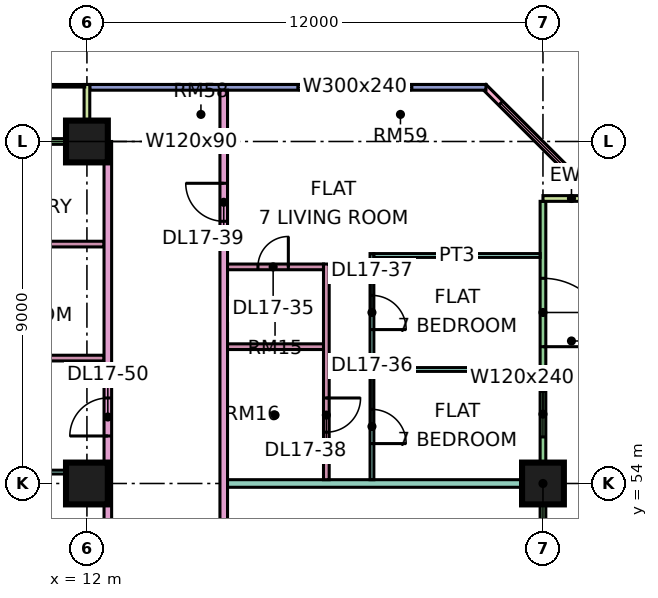
"""IFC4 building model, lengths in metres.
Left out: names, types, materials, properties, quantities, classifications, styles, units other than length and angle.
Written with IfcOpenShell. Run it as: python <this file> out.ifc"""

import sys

from ifc_helpers import new_model, si_unit, direction, frame, frame_2d, origin, origin_2d, place, context, subcontext, project, spatial, rectangle, extrude, element, fill, save


model = new_model("IFC4")
c1 = context("Model", 3, precision=1e-05, world=origin(), true_north=direction((0.0, 1.0)))
c2 = subcontext(c1, "Body", "Model", "MODEL_VIEW")
j1 = project(units=[si_unit("LENGTHUNIT", "METRE"), si_unit("PLANEANGLEUNIT", "RADIAN")], contexts=[c1])
p1 = place(None, origin())
s1 = spatial("IfcSite", under=j1, at=p1, CompositionType="ELEMENT")
p2 = place(p1, origin())
s2 = spatial("IfcBuilding", under=s1, at=p2, CompositionType="ELEMENT")
p3 = place(p2, frame((0.0, 0.0, 78.9)))
s3 = spatial("IfcBuildingStorey", under=s2, at=p3, CompositionType="ELEMENT", Elevation=78.9)
for number, where, z_axis, x_axis in (
    (1, (12.0, 54.0, 0.0), (0.0, 0.0, 1.0), (1.0, 0.0, 0.0)),
    (2, (12.0, 63.0, 0.0), (0.0, 0.0, 1.0), (1.0, 0.0, 0.0)),
    (3, (24.0, 54.0, 0.0), (0.0, 0.0, 1.0), (1.0, 0.0, 0.0)),
):
    element("IfcColumn", number, at=place(p3, frame(where, z_axis=z_axis, x_axis=x_axis)), inside=s3, PredefinedType="COLUMN", context=c2, shape_type="SweptSolid", body=[
        extrude(rectangle(XDim=1.1, YDim=1.1, at=origin_2d()), origin(), (0.0, 0.0, 1.0), 3.75),
    ])
p4 = place(p3, frame((24.0, 48.075, 0.0), z_axis=(0.0, 0.0, 1.0), x_axis=(0.0, 1.0, 0.0)))
e4 = element("IfcWall", 4, at=p4, inside=s3, PredefinedType="SOLIDWALL", context=c2, shape_type="SweptSolid", body=[
    extrude(rectangle(XDim=13.35, YDim=0.15, at=frame_2d((6.675, 0.0))), origin(), (0.0, 0.0, 1.0), 3.35),
])
p5 = place(p4, frame((0.538, 0.0, 0.45)))
e5 = element("IfcOpeningElement", 5, at=p5, cuts=e4, PredefinedType="OPENING", context=c2, shape_type="SweptSolid", body=[
    extrude(rectangle(XDim=4.2, YDim=2.4, at=frame_2d((2.1, 1.2))), frame((0.0, 0.085, 0.0), z_axis=(0.0, -1.0, 0.0), x_axis=(1.0, 0.0, 0.0)), (0.0, 0.0, 1.0), 0.17),
])
p6 = place(p4, frame((7.15, 0.0, 0.45)))
e6 = element("IfcOpeningElement", 6, at=p6, cuts=e4, PredefinedType="OPENING", context=c2, shape_type="SweptSolid", body=[
    extrude(rectangle(XDim=1.2, YDim=2.4, at=frame_2d((0.6, 1.2))), frame((0.0, 0.085, 0.0), z_axis=(0.0, -1.0, 0.0), x_axis=(1.0, 0.0, 0.0)), (0.0, 0.0, 1.0), 0.17),
])
p7 = place(p4, frame((9.525, 0.0, 0.0)))
e7 = element("IfcOpeningElement", 7, at=p7, cuts=e4, PredefinedType="OPENING", context=c2, shape_type="SweptSolid", body=[
    extrude(rectangle(XDim=1.8, YDim=2.4, at=frame_2d((0.9, 1.2))), frame((0.0, 0.085, 0.0), z_axis=(0.0, -1.0, 0.0), x_axis=(1.0, 0.0, 0.0)), (0.0, 0.0, 1.0), 0.17),
])
p8 = place(p3, frame((25.5, 61.5, 0.0), z_axis=(0.0, 0.0, 1.0), x_axis=(-1.0, 0.0, 0.0)))
e8 = element("IfcWall", 8, at=p8, inside=s3, PredefinedType="SOLIDWALL", context=c2, shape_type="SweptSolid", body=[
    extrude(rectangle(XDim=1.5, YDim=0.15, at=frame_2d((0.75, 0.0))), origin(), (0.0, 0.0, 1.0), 3.35),
])
p9 = place(p3, frame((25.447, 61.447, 0.0), z_axis=(0.0, 0.0, 1.0), x_axis=(-0.707106781187, 0.707106781187, 0.0)))
e9 = element("IfcWall", 9, at=p9, inside=s3, PredefinedType="SOLIDWALL", context=c2, shape_type="SweptSolid", body=[
    extrude(rectangle(XDim=4.243, YDim=0.15, at=frame_2d((2.121, 0.0))), origin(), (0.0, 0.0, 1.0), 3.35),
])
p10 = place(p9, frame((0.621, 0.0, 0.45)))
e10 = element("IfcOpeningElement", 10, at=p10, cuts=e9, PredefinedType="OPENING", context=c2, shape_type="SweptSolid", body=[
    extrude(rectangle(XDim=3.0, YDim=2.4, at=frame_2d((1.5, 1.2))), frame((0.0, 0.085, 0.0), z_axis=(0.0, -1.0, 0.0), x_axis=(1.0, 0.0, 0.0)), (0.0, 0.0, 1.0), 0.17),
])
p11 = place(p3, frame((22.5, 64.425, 0.0), z_axis=(0.0, 0.0, 1.0), x_axis=(-1.0, 0.0, 0.0)))
e11 = element("IfcWall", 11, at=p11, inside=s3, PredefinedType="SOLIDWALL", context=c2, shape_type="SweptSolid", body=[
    extrude(rectangle(XDim=10.425, YDim=0.15, at=frame_2d((5.212, 0.0))), origin(), (0.0, 0.0, 1.0), 3.35),
])
p12 = place(p11, frame((1.95, 0.0, 0.45)))
e12 = element("IfcOpeningElement", 12, at=p12, cuts=e11, PredefinedType="OPENING", context=c2, shape_type="SweptSolid", body=[
    extrude(rectangle(XDim=3.0, YDim=2.4, at=frame_2d((1.5, 1.2))), frame((0.0, 0.085, 0.0), z_axis=(0.0, -1.0, 0.0), x_axis=(1.0, 0.0, 0.0)), (0.0, 0.0, 1.0), 0.17),
])
p13 = place(p3, frame((11.925, 63.0, 0.0), z_axis=(0.0, 0.0, 1.0), x_axis=(-1.0, 0.0, 0.0)))
e13 = element("IfcWall", 13, at=p13, inside=s3, PredefinedType="SOLIDWALL", context=c2, shape_type="SweptSolid", body=[
    extrude(rectangle(XDim=10.35, YDim=0.15, at=frame_2d((5.175, 0.0))), origin(), (0.0, 0.0, 1.0), 3.35),
])
p14 = place(p13, frame((1.775, 0.0, 1.7)))
e14 = element("IfcOpeningElement", 14, at=p14, cuts=e13, PredefinedType="OPENING", context=c2, shape_type="SweptSolid", body=[
    extrude(rectangle(XDim=1.2, YDim=0.9, at=frame_2d((0.6, 0.45))), frame((0.0, 0.085, 0.0), z_axis=(0.0, -1.0, 0.0), x_axis=(1.0, 0.0, 0.0)), (0.0, 0.0, 1.0), 0.17),
])
p15 = place(p13, frame((6.962, 0.0, 0.0)))
e15 = element("IfcOpeningElement", 15, at=p15, cuts=e13, PredefinedType="OPENING", context=c2, shape_type="SweptSolid", body=[
    extrude(rectangle(XDim=1.8, YDim=2.4, at=frame_2d((0.9, 1.2))), frame((0.0, 0.085, 0.0), z_axis=(0.0, -1.0, 0.0), x_axis=(1.0, 0.0, 0.0)), (0.0, 0.0, 1.0), 0.17),
])
p16 = place(p3, frame((12.0, 64.5, 0.0), z_axis=(0.0, 0.0, 1.0), x_axis=(0.0, -1.0, 0.0)))
e16 = element("IfcWall", 16, at=p16, inside=s3, PredefinedType="SOLIDWALL", context=c2, shape_type="SweptSolid", body=[
    extrude(rectangle(XDim=1.5, YDim=0.15, at=frame_2d((0.75, 0.0))), origin(), (0.0, 0.0, 1.0), 3.35),
])
p17 = place(p3, frame((7.8, 54.3, 0.0), z_axis=(0.0, 0.0, 1.0), x_axis=(1.0, 0.0, 0.0)))
e17 = element("IfcWall", 17, at=p17, inside=s3, PredefinedType="PARTITIONING", context=c2, shape_type="SweptSolid", body=[
    extrude(rectangle(XDim=4.65, YDim=0.1, at=frame_2d((2.325, 0.0))), origin(), (0.0, 0.0, 1.0), 3.35),
])
for number, where, z_axis, x_axis in (
    (18, (7.825, 57.3, 0.0), (0.0, 0.0, 1.0), (1.0, 0.0, 0.0)),
    (19, (7.825, 60.3, 0.0), (0.0, 0.0, 1.0), (1.0, 0.0, 0.0)),
):
    element("IfcWall", number, at=place(p3, frame(where, z_axis=z_axis, x_axis=x_axis)), inside=s3, PredefinedType="PARTITIONING", context=c2, shape_type="SweptSolid", body=[
        extrude(rectangle(XDim=4.625, YDim=0.15, at=frame_2d((2.312, 0.0))), origin(), (0.0, 0.0, 1.0), 3.35),
    ])
p18 = place(p3, frame((12.55, 20.0, 0.0), z_axis=(0.0, 0.0, 1.0), x_axis=(0.0, 1.0, 0.0)))
e20 = element("IfcWall", 20, at=p18, inside=s3, PredefinedType="PARTITIONING", context=c2, shape_type="SweptSolid", body=[
    extrude(rectangle(XDim=43.0, YDim=0.2, at=frame_2d((21.5, 0.0))), origin(), (0.0, 0.0, 1.0), 3.35),
])
p19 = place(p18, frame((16.95, 0.0, 0.0)))
e21 = element("IfcOpeningElement", 21, at=p19, cuts=e20, PredefinedType="OPENING", context=c2, shape_type="SweptSolid", body=[
    extrude(rectangle(XDim=1.0, YDim=2.1, at=frame_2d((0.5, 1.05))), frame((0.0, 0.11, 0.0), z_axis=(0.0, -1.0, 0.0), x_axis=(1.0, 0.0, 0.0)), (0.0, 0.0, 1.0), 0.22),
])
p20 = place(p18, frame((35.25, 0.0, 0.0)))
e22 = element("IfcOpeningElement", 22, at=p20, cuts=e20, PredefinedType="OPENING", context=c2, shape_type="SweptSolid", body=[
    extrude(rectangle(XDim=1.0, YDim=2.1, at=frame_2d((0.5, 1.05))), frame((0.0, 0.11, 0.0), z_axis=(0.0, -1.0, 0.0), x_axis=(1.0, 0.0, 0.0)), (0.0, 0.0, 1.0), 0.22),
])
p21 = place(p18, frame((0.6, 0.0, 0.0)))
e23 = element("IfcOpeningElement", 23, at=p21, cuts=e20, PredefinedType="OPENING", context=c2, shape_type="SweptSolid", body=[
    extrude(rectangle(XDim=1.2, YDim=2.1, at=frame_2d((0.6, 1.05))), frame((0.0, 0.11, 0.0), z_axis=(0.0, -1.0, 0.0), x_axis=(1.0, 0.0, 0.0)), (0.0, 0.0, 1.0), 0.22),
])
p22 = place(p18, frame((14.1, 0.0, 0.0)))
e24 = element("IfcOpeningElement", 24, at=p22, cuts=e20, PredefinedType="OPENING", context=c2, shape_type="SweptSolid", body=[
    extrude(rectangle(XDim=1.0, YDim=2.1, at=frame_2d((0.5, 1.05))), frame((0.0, 0.11, 0.0), z_axis=(0.0, -1.0, 0.0), x_axis=(1.0, 0.0, 0.0)), (0.0, 0.0, 1.0), 0.22),
])
p23 = place(p3, frame((15.6, 51.225, 0.0), z_axis=(0.0, 0.0, 1.0), x_axis=(0.0, 1.0, 0.0)))
e25 = element("IfcWall", 25, at=p23, inside=s3, PredefinedType="PARTITIONING", context=c2, shape_type="SweptSolid", body=[
    extrude(rectangle(XDim=13.125, YDim=0.2, at=frame_2d((6.562, 0.0))), origin(), (0.0, 0.0, 1.0), 3.35),
])
p24 = place(p23, frame((9.675, 0.0, 0.0)))
e26 = element("IfcOpeningElement", 26, at=p24, cuts=e25, PredefinedType="OPENING", context=c2, shape_type="SweptSolid", body=[
    extrude(rectangle(XDim=1.0, YDim=2.1, at=frame_2d((0.5, 1.05))), frame((0.0, 0.11, 0.0), z_axis=(0.0, -1.0, 0.0), x_axis=(1.0, 0.0, 0.0)), (0.0, 0.0, 1.0), 0.22),
])
p25 = place(p3, frame((15.7, 54.0, 0.0), z_axis=(0.0, 0.0, 1.0), x_axis=(1.0, 0.0, 0.0)))
e27 = element("IfcWall", 27, at=p25, inside=s3, PredefinedType="PARTITIONING", context=c2, shape_type="SweptSolid", body=[
    extrude(rectangle(XDim=8.226, YDim=0.2, at=frame_2d((4.113, 0.0))), origin(), (0.0, 0.0, 1.0), 3.35),
])
p26 = place(p3, frame((15.7, 57.6, 0.0), z_axis=(0.0, 0.0, 1.0), x_axis=(1.0, 0.0, 0.0)))
e28 = element("IfcWall", 28, at=p26, inside=s3, PredefinedType="PARTITIONING", context=c2, shape_type="SweptSolid", body=[
    extrude(rectangle(XDim=2.525, YDim=0.15, at=frame_2d((1.263, 0.0))), origin(), (0.0, 0.0, 1.0), 3.35),
])
p27 = place(p3, frame((15.7, 59.7, 0.0), z_axis=(0.0, 0.0, 1.0), x_axis=(1.0, 0.0, 0.0)))
e29 = element("IfcWall", 29, at=p27, inside=s3, PredefinedType="PARTITIONING", context=c2, shape_type="SweptSolid", body=[
    extrude(rectangle(XDim=2.525, YDim=0.15, at=frame_2d((1.263, 0.0))), origin(), (0.0, 0.0, 1.0), 3.35),
])
p28 = place(p27, frame((0.8, 0.0, 0.0)))
e30 = element("IfcOpeningElement", 30, at=p28, cuts=e29, PredefinedType="OPENING", context=c2, shape_type="SweptSolid", body=[
    extrude(rectangle(XDim=0.8, YDim=2.1, at=frame_2d((0.4, 1.05))), frame((0.0, 0.085, 0.0), z_axis=(0.0, -1.0, 0.0), x_axis=(1.0, 0.0, 0.0)), (0.0, 0.0, 1.0), 0.17),
])
p29 = place(p3, frame((18.3, 54.1, 0.0), z_axis=(0.0, 0.0, 1.0), x_axis=(0.0, 1.0, 0.0)))
e31 = element("IfcWall", 31, at=p29, inside=s3, PredefinedType="PARTITIONING", context=c2, shape_type="SweptSolid", body=[
    extrude(rectangle(XDim=5.675, YDim=0.15, at=frame_2d((2.837, 0.0))), origin(), (0.0, 0.0, 1.0), 3.35),
])
p30 = place(p29, frame((1.25, 0.0, 0.0)))
e32 = element("IfcOpeningElement", 32, at=p30, cuts=e31, PredefinedType="OPENING", context=c2, shape_type="SweptSolid", body=[
    extrude(rectangle(XDim=0.9, YDim=2.1, at=frame_2d((0.45, 1.05))), frame((0.0, 0.085, 0.0), z_axis=(0.0, -1.0, 0.0), x_axis=(1.0, 0.0, 0.0)), (0.0, 0.0, 1.0), 0.17),
])
p31 = place(p3, frame((19.5, 54.1, 0.0), z_axis=(0.0, 0.0, 1.0), x_axis=(0.0, 1.0, 0.0)))
e33 = element("IfcWall", 33, at=p31, inside=s3, PredefinedType="PARTITIONING", context=c2, shape_type="SweptSolid", body=[
    extrude(rectangle(XDim=5.95, YDim=0.1, at=frame_2d((2.975, 0.0))), origin(), (0.0, 0.0, 1.0), 3.35),
])
p32 = place(p31, frame((0.95, 0.0, 0.0)))
e34 = element("IfcOpeningElement", 34, at=p32, cuts=e33, PredefinedType="OPENING", context=c2, shape_type="SweptSolid", body=[
    extrude(rectangle(XDim=0.9, YDim=2.1, at=frame_2d((0.45, 1.05))), frame((0.0, 0.06, 0.0), z_axis=(0.0, -1.0, 0.0), x_axis=(1.0, 0.0, 0.0)), (0.0, 0.0, 1.0), 0.12),
])
p33 = place(p31, frame((3.95, 0.0, 0.0)))
e35 = element("IfcOpeningElement", 35, at=p33, cuts=e33, PredefinedType="OPENING", context=c2, shape_type="SweptSolid", body=[
    extrude(rectangle(XDim=0.9, YDim=2.1, at=frame_2d((0.45, 1.05))), frame((0.0, 0.06, 0.0), z_axis=(0.0, -1.0, 0.0), x_axis=(1.0, 0.0, 0.0)), (0.0, 0.0, 1.0), 0.12),
])
for number, where, z_axis, x_axis in (
    (36, (19.55, 57.0, 0.0), (0.0, 0.0, 1.0), (1.0, 0.0, 0.0)),
    (37, (19.55, 60.0, 0.0), (0.0, 0.0, 1.0), (1.0, 0.0, 0.0)),
):
    element("IfcWall", number, at=place(p3, frame(where, z_axis=z_axis, x_axis=x_axis)), inside=s3, PredefinedType="PARTITIONING", context=c2, shape_type="SweptSolid", body=[
        extrude(rectangle(XDim=4.376, YDim=0.1, at=frame_2d((2.188, 0.0))), origin(), (0.0, 0.0, 1.0), 3.35),
    ])
p34 = place(p6, origin())
e38 = element("IfcWindow", 38, at=p34, inside=s3, PartitioningType="SINGLE_PANEL", PredefinedType="WINDOW", context=c2, shape_type="SweptSolid", body=[
    extrude(rectangle(XDim=1.2, YDim=2.4, at=frame_2d((0.6, 1.2))), frame((0.0, 0.03, 0.0), z_axis=(0.0, -1.0, 0.0), x_axis=(1.0, 0.0, 0.0)), (0.0, 0.0, 1.0), 0.06),
])
fill(e6, e38)
p35 = place(p7, frame((1.8, 0.0, 0.0), z_axis=(0.0, 0.0, 1.0), x_axis=(-1.0, 0.0, 0.0)))
e39 = element("IfcDoor", 39, at=p35, inside=s3, OperationType="DOUBLE_DOOR_SINGLE_SWING", PredefinedType="DOOR", context=c2, shape_type="SweptSolid", body=[
    extrude(rectangle(XDim=1.8, YDim=2.4, at=frame_2d((0.9, 1.2))), frame((0.0, 0.025, 0.0), z_axis=(0.0, -1.0, 0.0), x_axis=(1.0, 0.0, 0.0)), (0.0, 0.0, 1.0), 0.05),
])
fill(e7, e39)
p36 = place(p10, origin())
e40 = element("IfcWindow", 40, at=p36, inside=s3, PartitioningType="SINGLE_PANEL", PredefinedType="WINDOW", context=c2, shape_type="SweptSolid", body=[
    extrude(rectangle(XDim=3.0, YDim=2.4, at=frame_2d((1.5, 1.2))), frame((0.0, 0.03, 0.0), z_axis=(0.0, -1.0, 0.0), x_axis=(1.0, 0.0, 0.0)), (0.0, 0.0, 1.0), 0.06),
])
fill(e10, e40)
p37 = place(p12, origin())
e41 = element("IfcWindow", 41, at=p37, inside=s3, PartitioningType="SINGLE_PANEL", PredefinedType="WINDOW", context=c2, shape_type="SweptSolid", body=[
    extrude(rectangle(XDim=3.0, YDim=2.4, at=frame_2d((1.5, 1.2))), frame((0.0, 0.03, 0.0), z_axis=(0.0, -1.0, 0.0), x_axis=(1.0, 0.0, 0.0)), (0.0, 0.0, 1.0), 0.06),
])
fill(e12, e41)
p38 = place(p28, frame((0.8, 0.0, 0.0), z_axis=(0.0, 0.0, 1.0), x_axis=(-1.0, 0.0, 0.0)))
e42 = element("IfcDoor", 42, at=p38, inside=s3, OperationType="SINGLE_SWING_RIGHT", PredefinedType="DOOR", context=c2, shape_type="SweptSolid", body=[
    extrude(rectangle(XDim=0.8, YDim=2.1, at=frame_2d((0.4, 1.05))), frame((0.0, 0.025, 0.0), z_axis=(0.0, -1.0, 0.0), x_axis=(1.0, 0.0, 0.0)), (0.0, 0.0, 1.0), 0.05),
])
fill(e30, e42)
p39 = place(p32, frame((0.9, 0.0, 0.0), z_axis=(0.0, 0.0, 1.0), x_axis=(-1.0, 0.0, 0.0)))
e43 = element("IfcDoor", 43, at=p39, inside=s3, OperationType="SINGLE_SWING_LEFT", PredefinedType="DOOR", context=c2, shape_type="SweptSolid", body=[
    extrude(rectangle(XDim=0.9, YDim=2.1, at=frame_2d((0.45, 1.05))), frame((0.0, 0.025, 0.0), z_axis=(0.0, -1.0, 0.0), x_axis=(1.0, 0.0, 0.0)), (0.0, 0.0, 1.0), 0.05),
])
fill(e34, e43)
p40 = place(p33, frame((0.9, 0.0, 0.0), z_axis=(0.0, 0.0, 1.0), x_axis=(-1.0, 0.0, 0.0)))
e44 = element("IfcDoor", 44, at=p40, inside=s3, OperationType="SINGLE_SWING_LEFT", PredefinedType="DOOR", context=c2, shape_type="SweptSolid", body=[
    extrude(rectangle(XDim=0.9, YDim=2.1, at=frame_2d((0.45, 1.05))), frame((0.0, 0.025, 0.0), z_axis=(0.0, -1.0, 0.0), x_axis=(1.0, 0.0, 0.0)), (0.0, 0.0, 1.0), 0.05),
])
fill(e35, e44)
p41 = place(p30, origin())
e45 = element("IfcDoor", 45, at=p41, inside=s3, OperationType="SINGLE_SWING_RIGHT", PredefinedType="DOOR", context=c2, shape_type="SweptSolid", body=[
    extrude(rectangle(XDim=0.9, YDim=2.1, at=frame_2d((0.45, 1.05))), frame((0.0, 0.025, 0.0), z_axis=(0.0, -1.0, 0.0), x_axis=(1.0, 0.0, 0.0)), (0.0, 0.0, 1.0), 0.05),
])
fill(e32, e45)
p42 = place(p24, frame((1.0, 0.0, 0.0), z_axis=(0.0, 0.0, 1.0), x_axis=(-1.0, 0.0, 0.0)))
e46 = element("IfcDoor", 46, at=p42, inside=s3, OperationType="SINGLE_SWING_RIGHT", PredefinedType="DOOR", context=c2, shape_type="SweptSolid", body=[
    extrude(rectangle(XDim=1.0, YDim=2.1, at=frame_2d((0.5, 1.05))), frame((0.0, 0.025, 0.0), z_axis=(0.0, -1.0, 0.0), x_axis=(1.0, 0.0, 0.0)), (0.0, 0.0, 1.0), 0.05),
])
fill(e26, e46)
p43 = place(p20, origin())
e47 = element("IfcDoor", 47, at=p43, inside=s3, OperationType="SINGLE_SWING_LEFT", PredefinedType="DOOR", context=c2, shape_type="SweptSolid", body=[
    extrude(rectangle(XDim=1.0, YDim=2.1, at=frame_2d((0.5, 1.05))), frame((0.0, 0.025, 0.0), z_axis=(0.0, -1.0, 0.0), x_axis=(1.0, 0.0, 0.0)), (0.0, 0.0, 1.0), 0.05),
])
fill(e22, e47)
save(model, sys.argv[1])
